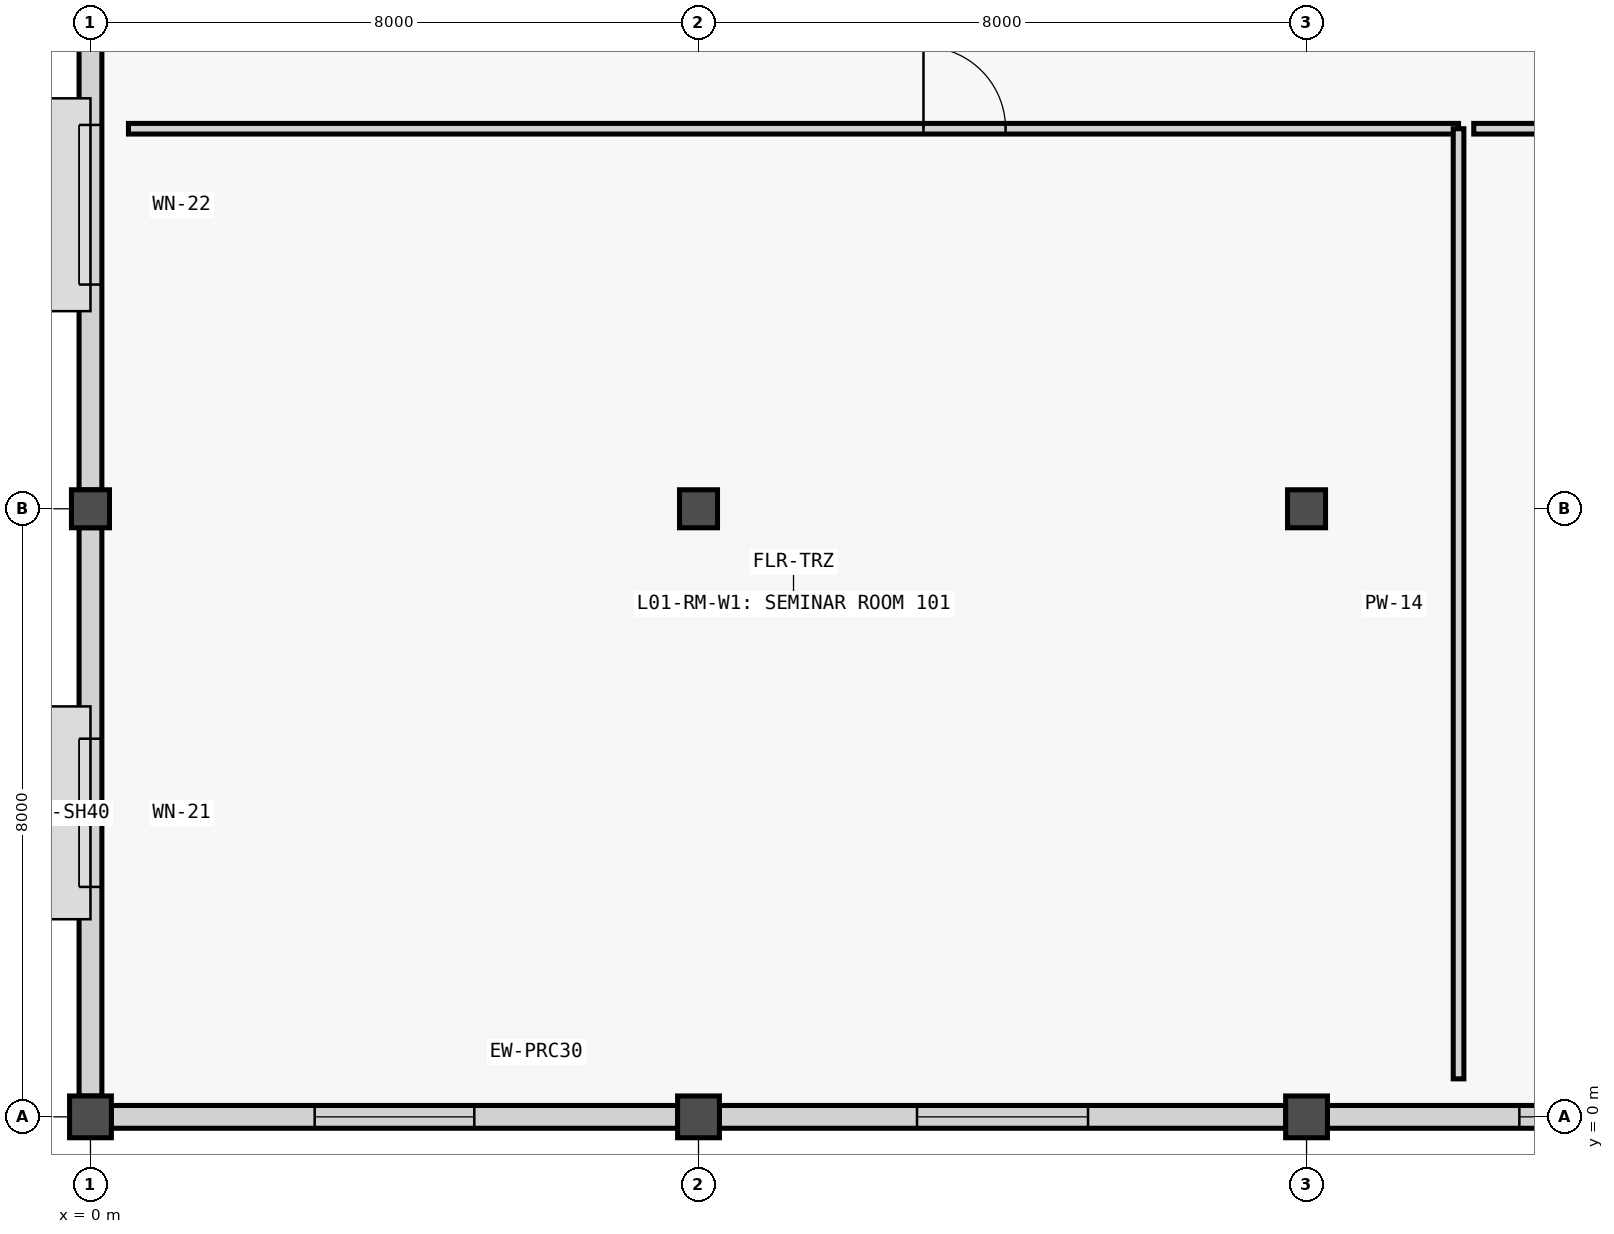
"""IFC4 building model, lengths in metres.
Left out: names, types, materials, properties, quantities, classifications, styles, units other than length and angle.
Written with IfcOpenShell. Run it as: python <this file> out.ifc"""

import sys

from ifc_helpers import new_model, si_unit, direction, frame, frame_2d, origin, origin_with_axes, origin_2d, place, context, subcontext, project, spatial, rectangle, extrude, element, fill, save


model = new_model("IFC4")
c1 = context("Model", 3, precision=1e-05, world=origin(), true_north=direction((0.0, 1.0)))
c2 = subcontext(c1, "Body", "Model", "MODEL_VIEW")
j1 = project(units=[si_unit("LENGTHUNIT", "METRE"), si_unit("PLANEANGLEUNIT", "RADIAN")], contexts=[c1])
p1 = place(None, origin())
s1 = spatial("IfcSite", under=j1, at=p1, CompositionType="ELEMENT")
p2 = place(p1, origin())
s2 = spatial("IfcBuilding", under=s1, at=p2, CompositionType="ELEMENT")
p3 = place(p2, frame((0.0, 0.0, 5.4)))
s3 = spatial("IfcBuildingStorey", under=s2, at=p3, CompositionType="ELEMENT", Elevation=5.4)
p4 = place(p3, origin_with_axes())
e1 = element("IfcColumn", 1, at=p4, inside=s3, PredefinedType="COLUMN", context=c2, shape_type="SweptSolid", body=[
    extrude(rectangle(XDim=0.55, YDim=0.55, at=origin_2d()), origin(), (0.0, 0.0, 1.0), 4.8),
])
p5 = place(p3, frame((0.0, 8.0, 0.0), z_axis=(0.0, 0.0, 1.0), x_axis=(1.0, 0.0, 0.0)))
e2 = element("IfcColumn", 2, at=p5, inside=s3, PredefinedType="COLUMN", context=c2, shape_type="SweptSolid", body=[
    extrude(rectangle(XDim=0.5, YDim=0.5, at=origin_2d()), origin(), (0.0, 0.0, 1.0), 4.8),
])
p6 = place(p3, frame((8.0, 0.0, 0.0), z_axis=(0.0, 0.0, 1.0), x_axis=(1.0, 0.0, 0.0)))
e3 = element("IfcColumn", 3, at=p6, inside=s3, PredefinedType="COLUMN", context=c2, shape_type="SweptSolid", body=[
    extrude(rectangle(XDim=0.55, YDim=0.55, at=origin_2d()), origin(), (0.0, 0.0, 1.0), 4.8),
])
p7 = place(p3, frame((8.0, 8.0, 0.0), z_axis=(0.0, 0.0, 1.0), x_axis=(1.0, 0.0, 0.0)))
e4 = element("IfcColumn", 4, at=p7, inside=s3, PredefinedType="COLUMN", context=c2, shape_type="SweptSolid", body=[
    extrude(rectangle(XDim=0.5, YDim=0.5, at=origin_2d()), origin(), (0.0, 0.0, 1.0), 4.8),
])
p8 = place(p3, frame((16.0, 0.0, 0.0), z_axis=(0.0, 0.0, 1.0), x_axis=(1.0, 0.0, 0.0)))
e5 = element("IfcColumn", 5, at=p8, inside=s3, PredefinedType="COLUMN", context=c2, shape_type="SweptSolid", body=[
    extrude(rectangle(XDim=0.55, YDim=0.55, at=origin_2d()), origin(), (0.0, 0.0, 1.0), 4.8),
])
p9 = place(p3, frame((16.0, 8.0, 0.0), z_axis=(0.0, 0.0, 1.0), x_axis=(1.0, 0.0, 0.0)))
e6 = element("IfcColumn", 6, at=p9, inside=s3, PredefinedType="COLUMN", context=c2, shape_type="SweptSolid", body=[
    extrude(rectangle(XDim=0.5, YDim=0.5, at=origin_2d()), origin(), (0.0, 0.0, 1.0), 4.8),
])
p10 = place(p3, frame((0.0, 0.273, 0.0), z_axis=(0.0, 0.0, 1.0), x_axis=(0.0, 1.0, 0.0)))
e7 = element("IfcWall", 7, at=p10, inside=s3, PredefinedType="SOLIDWALL", context=c2, shape_type="SweptSolid", body=[
    extrude(rectangle(XDim=7.479, YDim=0.3, at=frame_2d((3.74, 0.0))), origin(), (0.0, 0.0, 1.0), 3.92),
])
p11 = place(p10, frame((2.752, 0.0, 0.88)))
e8 = element("IfcOpeningElement", 8, at=p11, cuts=e7, PredefinedType="OPENING", context=c2, shape_type="SweptSolid", body=[
    extrude(rectangle(XDim=1.95, YDim=1.55, at=frame_2d((0.975, 0.775))), frame((0.0, 0.16, 0.0), z_axis=(0.0, -1.0, 0.0), x_axis=(1.0, 0.0, 0.0)), (0.0, 0.0, 1.0), 0.32),
])
p12 = place(p3, frame((0.0, 8.248, 0.0), z_axis=(0.0, 0.0, 1.0), x_axis=(0.0, 1.0, 0.0)))
e9 = element("IfcWall", 9, at=p12, inside=s3, PredefinedType="SOLIDWALL", context=c2, shape_type="SweptSolid", body=[
    extrude(rectangle(XDim=7.504, YDim=0.3, at=frame_2d((3.752, 0.0))), origin(), (0.0, 0.0, 1.0), 3.92),
])
p13 = place(p12, frame((2.702, 0.0, 0.88)))
e10 = element("IfcOpeningElement", 10, at=p13, cuts=e9, PredefinedType="OPENING", context=c2, shape_type="SweptSolid", body=[
    extrude(rectangle(XDim=2.1, YDim=1.6, at=frame_2d((1.05, 0.8))), frame((0.0, 0.16, 0.0), z_axis=(0.0, -1.0, 0.0), x_axis=(1.0, 0.0, 0.0)), (0.0, 0.0, 1.0), 0.32),
])
p14 = place(p3, frame((7.727, 0.0, 0.0), z_axis=(0.0, 0.0, 1.0), x_axis=(-1.0, 0.0, 0.0)))
e11 = element("IfcWall", 11, at=p14, inside=s3, PredefinedType="SOLIDWALL", context=c2, shape_type="SweptSolid", body=[
    extrude(rectangle(XDim=7.454, YDim=0.3, at=frame_2d((3.727, 0.0))), origin(), (0.0, 0.0, 1.0), 4.02),
])
p15 = place(p14, frame((2.677, 0.0, 0.88)))
e12 = element("IfcOpeningElement", 12, at=p15, cuts=e11, PredefinedType="OPENING", context=c2, shape_type="SweptSolid", body=[
    extrude(rectangle(XDim=2.1, YDim=1.6, at=frame_2d((1.05, 0.8))), frame((0.0, 0.16, 0.0), z_axis=(0.0, -1.0, 0.0), x_axis=(1.0, 0.0, 0.0)), (0.0, 0.0, 1.0), 0.32),
])
p16 = place(p3, frame((15.727, 0.0, 0.0), z_axis=(0.0, 0.0, 1.0), x_axis=(-1.0, 0.0, 0.0)))
e13 = element("IfcWall", 13, at=p16, inside=s3, PredefinedType="SOLIDWALL", context=c2, shape_type="SweptSolid", body=[
    extrude(rectangle(XDim=7.454, YDim=0.3, at=frame_2d((3.727, 0.0))), origin(), (0.0, 0.0, 1.0), 4.02),
])
p17 = place(p16, frame((2.602, 0.0, 0.88)))
e14 = element("IfcOpeningElement", 14, at=p17, cuts=e13, PredefinedType="OPENING", context=c2, shape_type="SweptSolid", body=[
    extrude(rectangle(XDim=2.25, YDim=1.6, at=frame_2d((1.125, 0.8))), frame((0.0, 0.16, 0.0), z_axis=(0.0, -1.0, 0.0), x_axis=(1.0, 0.0, 0.0)), (0.0, 0.0, 1.0), 0.32),
])
p18 = place(p3, frame((23.727, 0.0, 0.0), z_axis=(0.0, 0.0, 1.0), x_axis=(-1.0, 0.0, 0.0)))
e15 = element("IfcWall", 15, at=p18, inside=s3, PredefinedType="SOLIDWALL", context=c2, shape_type="SweptSolid", body=[
    extrude(rectangle(XDim=7.454, YDim=0.3, at=frame_2d((3.727, 0.0))), origin(), (0.0, 0.0, 1.0), 4.02),
])
p19 = place(p18, frame((2.527, 0.0, 0.88)))
e16 = element("IfcOpeningElement", 16, at=p19, cuts=e15, PredefinedType="OPENING", context=c2, shape_type="SweptSolid", body=[
    extrude(rectangle(XDim=2.4, YDim=1.65, at=frame_2d((1.2, 0.825))), frame((0.0, 0.16, 0.0), z_axis=(0.0, -1.0, 0.0), x_axis=(1.0, 0.0, 0.0)), (0.0, 0.0, 1.0), 0.32),
])
p20 = place(p3, frame((0.5, 13.0, 0.0), z_axis=(0.0, 0.0, 1.0), x_axis=(1.0, 0.0, 0.0)))
e17 = element("IfcWall", 17, at=p20, inside=s3, PredefinedType="PARTITIONING", context=c2, shape_type="SweptSolid", body=[
    extrude(rectangle(XDim=17.5, YDim=0.14, at=frame_2d((8.75, 0.0))), origin(), (0.0, 0.0, 1.0), 4.54),
])
p21 = place(p20, frame((10.46, 0.0, 0.0)))
e18 = element("IfcOpeningElement", 18, at=p21, cuts=e17, PredefinedType="OPENING", context=c2, shape_type="SweptSolid", body=[
    extrude(rectangle(XDim=1.08, YDim=2.2, at=frame_2d((0.54, 1.1))), frame((0.0, 0.08, 0.0), z_axis=(0.0, -1.0, 0.0), x_axis=(1.0, 0.0, 0.0)), (0.0, 0.0, 1.0), 0.16),
])
p22 = place(p3, frame((18.0, 0.5, 0.0), z_axis=(0.0, 0.0, 1.0), x_axis=(0.0, 1.0, 0.0)))
e19 = element("IfcWall", 19, at=p22, inside=s3, PredefinedType="PARTITIONING", context=c2, shape_type="SweptSolid", body=[
    extrude(rectangle(XDim=12.5, YDim=0.14, at=frame_2d((6.25, 0.0))), origin(), (0.0, 0.0, 1.0), 4.54),
])
p23 = place(p3, frame((18.2, 13.0, 0.0), z_axis=(0.0, 0.0, 1.0), x_axis=(1.0, 0.0, 0.0)))
e20 = element("IfcWall", 20, at=p23, inside=s3, PredefinedType="PARTITIONING", context=c2, shape_type="SweptSolid", body=[
    extrude(rectangle(XDim=37.3, YDim=0.14, at=frame_2d((18.65, 0.0))), origin(), (0.0, 0.0, 1.0), 4.54),
])
p24 = place(p23, frame((7.925, 0.0, 0.0)))
e21 = element("IfcOpeningElement", 21, at=p24, cuts=e20, PredefinedType="OPENING", context=c2, shape_type="SweptSolid", body=[
    extrude(rectangle(XDim=0.95, YDim=2.1, at=frame_2d((0.475, 1.05))), frame((0.0, 0.08, 0.0), z_axis=(0.0, -1.0, 0.0), x_axis=(1.0, 0.0, 0.0)), (0.0, 0.0, 1.0), 0.16),
])
p25 = place(p11, origin())
e22 = element("IfcWindow", 22, at=p25, inside=s3, PartitioningType="SINGLE_PANEL", PredefinedType="WINDOW", context=c2, shape_type="SweptSolid", body=[
    extrude(rectangle(XDim=1.95, YDim=1.55, at=frame_2d((0.975, 0.775))), frame((0.0, 0.03, 0.0), z_axis=(0.0, -1.0, 0.0), x_axis=(1.0, 0.0, 0.0)), (0.0, 0.0, 1.0), 0.06),
])
fill(e8, e22)
p26 = place(p13, origin())
e23 = element("IfcWindow", 23, at=p26, inside=s3, PartitioningType="SINGLE_PANEL", PredefinedType="WINDOW", context=c2, shape_type="SweptSolid", body=[
    extrude(rectangle(XDim=2.1, YDim=1.6, at=frame_2d((1.05, 0.8))), frame((0.0, 0.03, 0.0), z_axis=(0.0, -1.0, 0.0), x_axis=(1.0, 0.0, 0.0)), (0.0, 0.0, 1.0), 0.06),
])
fill(e10, e23)
p27 = place(p15, origin())
e24 = element("IfcWindow", 24, at=p27, inside=s3, PartitioningType="SINGLE_PANEL", PredefinedType="WINDOW", context=c2, shape_type="SweptSolid", body=[
    extrude(rectangle(XDim=2.1, YDim=1.6, at=frame_2d((1.05, 0.8))), frame((0.0, 0.03, 0.0), z_axis=(0.0, -1.0, 0.0), x_axis=(1.0, 0.0, 0.0)), (0.0, 0.0, 1.0), 0.06),
])
fill(e12, e24)
p28 = place(p17, origin())
e25 = element("IfcWindow", 25, at=p28, inside=s3, PartitioningType="SINGLE_PANEL", PredefinedType="WINDOW", context=c2, shape_type="SweptSolid", body=[
    extrude(rectangle(XDim=2.25, YDim=1.6, at=frame_2d((1.125, 0.8))), frame((0.0, 0.03, 0.0), z_axis=(0.0, -1.0, 0.0), x_axis=(1.0, 0.0, 0.0)), (0.0, 0.0, 1.0), 0.06),
])
fill(e14, e25)
p29 = place(p19, origin())
e26 = element("IfcWindow", 26, at=p29, inside=s3, PartitioningType="SINGLE_PANEL", PredefinedType="WINDOW", context=c2, shape_type="SweptSolid", body=[
    extrude(rectangle(XDim=2.4, YDim=1.65, at=frame_2d((1.2, 0.825))), frame((0.0, 0.03, 0.0), z_axis=(0.0, -1.0, 0.0), x_axis=(1.0, 0.0, 0.0)), (0.0, 0.0, 1.0), 0.06),
])
fill(e16, e26)
p30 = place(p21, origin())
e27 = element("IfcDoor", 27, at=p30, inside=s3, OperationType="SINGLE_SWING_LEFT", PredefinedType="DOOR", context=c2, shape_type="SweptSolid", body=[
    extrude(rectangle(XDim=1.08, YDim=2.2, at=frame_2d((0.54, 1.1))), frame((0.0, 0.025, 0.0), z_axis=(0.0, -1.0, 0.0), x_axis=(1.0, 0.0, 0.0)), (0.0, 0.0, 1.0), 0.05),
])
fill(e18, e27)
save(model, sys.argv[1])
